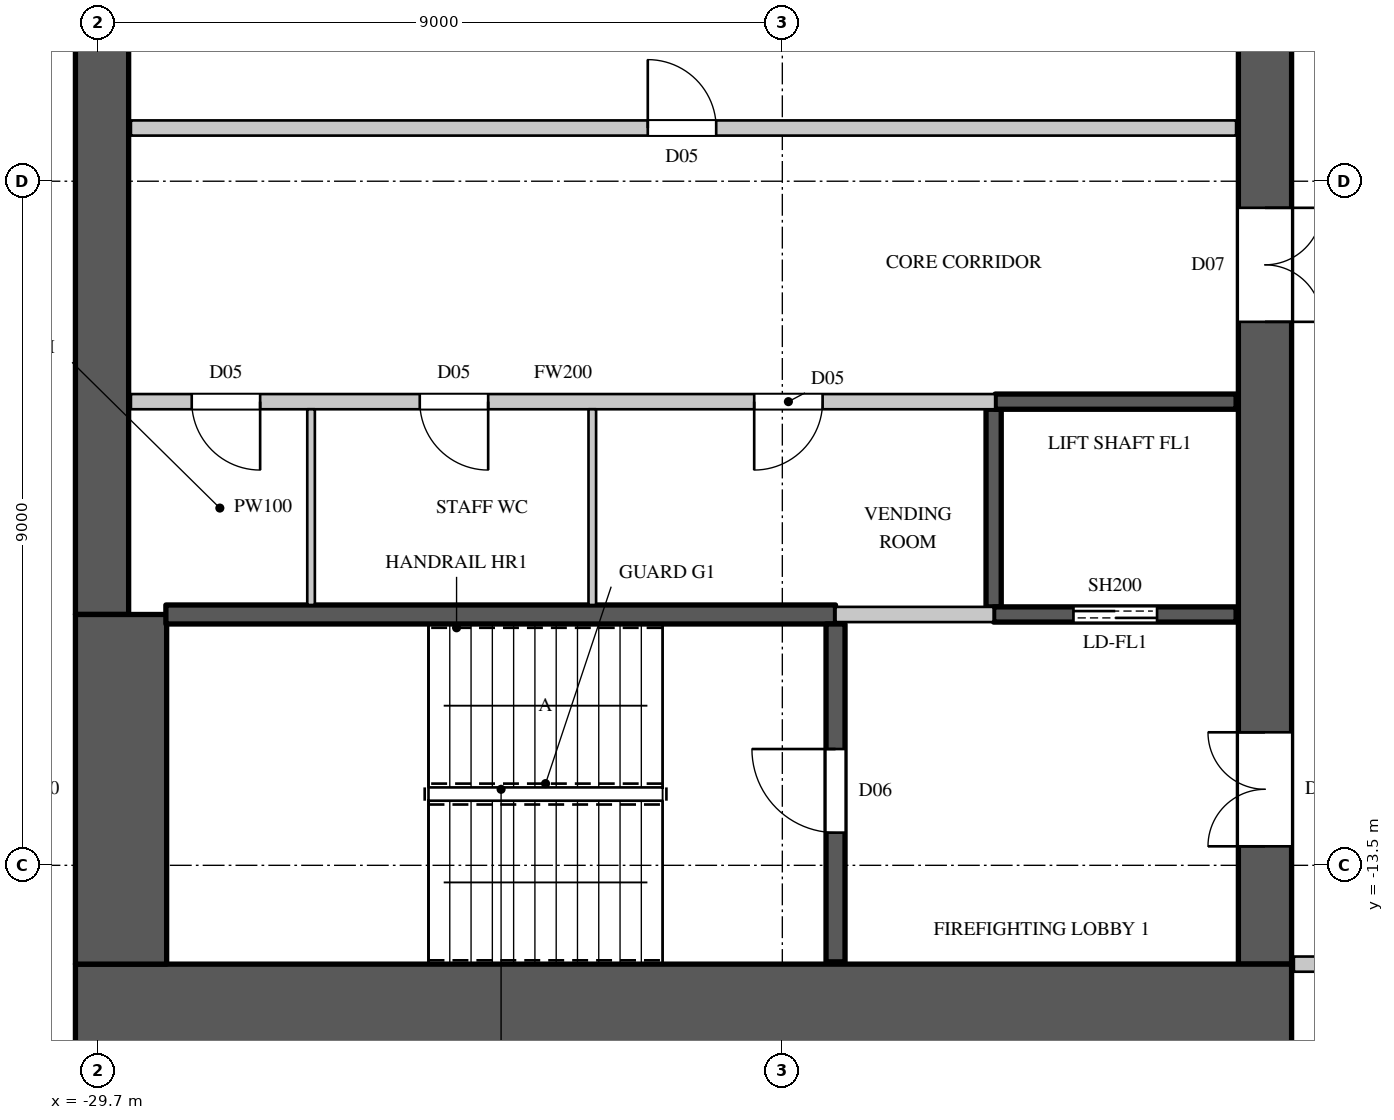
"""IFC4 building model, lengths in metres.
Left out: names, types, materials, properties, quantities, classifications, styles, units other than length and angle.
Written with IfcOpenShell. Run it as: python <this file> out.ifc"""

import sys

from ifc_helpers import new_model, si_unit, direction, frame, frame_2d, origin, place, context, subcontext, project, spatial, rectangle, extrude, element, fill, save


model = new_model("IFC4")
c1 = context("Model", 3, precision=1e-05, world=origin(), true_north=direction((0.0, 1.0)))
c2 = subcontext(c1, "Body", "Model", "MODEL_VIEW")
j1 = project(units=[si_unit("LENGTHUNIT", "METRE"), si_unit("PLANEANGLEUNIT", "RADIAN")], contexts=[c1])
p1 = place(None, origin())
s1 = spatial("IfcSite", under=j1, at=p1, CompositionType="ELEMENT")
p2 = place(p1, origin())
s2 = spatial("IfcBuilding", under=s1, at=p2, CompositionType="ELEMENT")
p3 = place(p2, frame((0.0, 0.0, 263.9)))
s3 = spatial("IfcBuildingStorey", under=s2, at=p3, CompositionType="ELEMENT", Elevation=263.9)
p4 = place(p3, frame((-30.0, -15.4, 0.0), z_axis=(0.0, 0.0, 1.0), x_axis=(1.0, 0.0, 0.0)))
e1 = element("IfcWall", 1, at=p4, inside=s3, PredefinedType="SHEAR", context=c2, shape_type="SweptSolid", body=[
    extrude(rectangle(XDim=16.0, YDim=1.2, at=frame_2d((8.0, 0.0))), origin(), (0.0, 0.0, 1.0), 4.1),
])
p5 = place(p3, frame((-14.35, -14.8, 0.0), z_axis=(0.0, 0.0, 1.0), x_axis=(0.0, 1.0, 0.0)))
e2 = element("IfcWall", 2, at=p5, inside=s3, PredefinedType="SHEAR", context=c2, shape_type="SweptSolid", body=[
    extrude(rectangle(XDim=29.6, YDim=0.7, at=frame_2d((14.8, 0.0))), origin(), (0.0, 0.0, 1.0), 4.1),
])
p6 = place(p5, frame((1.55, 0.0, 0.0)))
e3 = element("IfcOpeningElement", 3, at=p6, cuts=e2, PredefinedType="OPENING", context=c2, shape_type="SweptSolid", body=[
    extrude(rectangle(XDim=1.5, YDim=2.4, at=frame_2d((0.75, 1.2))), frame((0.0, 0.36, 0.0), z_axis=(0.0, -1.0, 0.0), x_axis=(1.0, 0.0, 0.0)), (0.0, 0.0, 1.0), 0.72),
])
p7 = place(p5, frame((26.55, 0.0, 0.0)))
e4 = element("IfcOpeningElement", 4, at=p7, cuts=e2, PredefinedType="OPENING", context=c2, shape_type="SweptSolid", body=[
    extrude(rectangle(XDim=1.5, YDim=2.4, at=frame_2d((0.75, 1.2))), frame((0.0, 0.36, 0.0), z_axis=(0.0, -1.0, 0.0), x_axis=(1.0, 0.0, 0.0)), (0.0, 0.0, 1.0), 0.72),
])
p8 = place(p5, frame((8.45, 0.0, 0.0)))
e5 = element("IfcOpeningElement", 5, at=p8, cuts=e2, PredefinedType="OPENING", context=c2, shape_type="SweptSolid", body=[
    extrude(rectangle(XDim=1.5, YDim=2.4, at=frame_2d((0.75, 1.2))), frame((0.0, 0.36, 0.0), z_axis=(0.0, -1.0, 0.0), x_axis=(1.0, 0.0, 0.0)), (0.0, 0.0, 1.0), 0.72),
])
p9 = place(p5, frame((19.65, 0.0, 0.0)))
e6 = element("IfcOpeningElement", 6, at=p9, cuts=e2, PredefinedType="OPENING", context=c2, shape_type="SweptSolid", body=[
    extrude(rectangle(XDim=1.5, YDim=2.4, at=frame_2d((0.75, 1.2))), frame((0.0, 0.36, 0.0), z_axis=(0.0, -1.0, 0.0), x_axis=(1.0, 0.0, 0.0)), (0.0, 0.0, 1.0), 0.72),
])
p10 = place(p5, frame((14.5, 0.0, 0.0)))
e7 = element("IfcOpeningElement", 7, at=p10, cuts=e2, PredefinedType="OPENING", context=c2, shape_type="SweptSolid", body=[
    extrude(rectangle(XDim=0.6, YDim=2.0, at=frame_2d((0.3, 1.0))), frame((0.0, 0.36, 0.0), z_axis=(0.0, -1.0, 0.0), x_axis=(1.0, 0.0, 0.0)), (0.0, 0.0, 1.0), 0.72),
])
p11 = place(p3, frame((-29.65, -10.2, 0.0), z_axis=(0.0, 0.0, 1.0), x_axis=(0.0, 1.0, 0.0)))
e8 = element("IfcWall", 8, at=p11, inside=s3, PredefinedType="SHEAR", context=c2, shape_type="SweptSolid", body=[
    extrude(rectangle(XDim=20.4, YDim=0.7, at=frame_2d((10.2, 0.0))), origin(), (0.0, 0.0, 1.0), 4.1),
])
p12 = place(p3, frame((-29.4, -14.8, 0.0), z_axis=(0.0, 0.0, 1.0), x_axis=(0.0, 1.0, 0.0)))
e9 = element("IfcWall", 9, at=p12, inside=s3, PredefinedType="SHEAR", context=c2, shape_type="SweptSolid", body=[
    extrude(rectangle(XDim=4.6, YDim=1.2, at=frame_2d((2.3, 0.0))), origin(), (0.0, 0.0, 1.0), 4.1),
])
p13 = place(p3, frame((-29.27, -7.4, 0.0), z_axis=(0.0, 0.0, 1.0), x_axis=(1.0, 0.0, 0.0)))
e10 = element("IfcWall", 10, at=p13, inside=s3, PredefinedType="PARTITIONING", context=c2, shape_type="SweptSolid", body=[
    extrude(rectangle(XDim=11.37, YDim=0.2, at=frame_2d((5.685, 0.0))), origin(), (0.0, 0.0, 1.0), 3.8),
])
p14 = place(p13, frame((0.8, 0.0, 0.0)))
e11 = element("IfcOpeningElement", 11, at=p14, cuts=e10, PredefinedType="OPENING", context=c2, shape_type="SweptSolid", body=[
    extrude(rectangle(XDim=0.9, YDim=2.2, at=frame_2d((0.45, 1.1))), frame((0.0, 0.11, 0.0), z_axis=(0.0, -1.0, 0.0), x_axis=(1.0, 0.0, 0.0)), (0.0, 0.0, 1.0), 0.22),
])
p15 = place(p13, frame((3.8, 0.0, 0.0)))
e12 = element("IfcOpeningElement", 12, at=p15, cuts=e10, PredefinedType="OPENING", context=c2, shape_type="SweptSolid", body=[
    extrude(rectangle(XDim=0.9, YDim=2.2, at=frame_2d((0.45, 1.1))), frame((0.0, 0.11, 0.0), z_axis=(0.0, -1.0, 0.0), x_axis=(1.0, 0.0, 0.0)), (0.0, 0.0, 1.0), 0.22),
])
p16 = place(p13, frame((8.2, 0.0, 0.0)))
e13 = element("IfcOpeningElement", 13, at=p16, cuts=e10, PredefinedType="OPENING", context=c2, shape_type="SweptSolid", body=[
    extrude(rectangle(XDim=0.9, YDim=2.2, at=frame_2d((0.45, 1.1))), frame((0.0, 0.11, 0.0), z_axis=(0.0, -1.0, 0.0), x_axis=(1.0, 0.0, 0.0)), (0.0, 0.0, 1.0), 0.22),
])
p17 = place(p3, frame((-29.27, -3.8, 0.0), z_axis=(0.0, 0.0, 1.0), x_axis=(1.0, 0.0, 0.0)))
e14 = element("IfcWall", 14, at=p17, inside=s3, PredefinedType="PARTITIONING", context=c2, shape_type="SweptSolid", body=[
    extrude(rectangle(XDim=14.54, YDim=0.2, at=frame_2d((7.27, 0.0))), origin(), (0.0, 0.0, 1.0), 3.8),
])
p18 = place(p17, frame((6.8, 0.0, 0.0)))
e15 = element("IfcOpeningElement", 15, at=p18, cuts=e14, PredefinedType="OPENING", context=c2, shape_type="SweptSolid", body=[
    extrude(rectangle(XDim=0.9, YDim=2.2, at=frame_2d((0.45, 1.1))), frame((0.0, 0.11, 0.0), z_axis=(0.0, -1.0, 0.0), x_axis=(1.0, 0.0, 0.0)), (0.0, 0.0, 1.0), 0.22),
])
p19 = place(p3, frame((-20.0, -10.2, 0.0), z_axis=(0.0, 0.0, 1.0), x_axis=(1.0, 0.0, 0.0)))
e16 = element("IfcWall", 16, at=p19, inside=s3, PredefinedType="PARTITIONING", context=c2, shape_type="SweptSolid", body=[
    extrude(rectangle(XDim=2.08, YDim=0.2, at=frame_2d((1.04, 0.0))), origin(), (0.0, 0.0, 1.0), 3.8),
])
p20 = place(p3, frame((-13.97, -14.8, 0.0), z_axis=(0.0, 0.0, 1.0), x_axis=(1.0, 0.0, 0.0)))
e17 = element("IfcWall", 17, at=p20, inside=s3, PredefinedType="PARTITIONING", context=c2, shape_type="SweptSolid", body=[
    extrude(rectangle(XDim=2.87, YDim=0.2, at=frame_2d((1.435, 0.0))), origin(), (0.0, 0.0, 1.0), 3.8),
])
p21 = place(p3, frame((-17.92, -10.1, 0.0), z_axis=(0.0, 0.0, 1.0), x_axis=(0.0, 1.0, 0.0)))
e18 = element("IfcWall", 18, at=p21, inside=s3, PredefinedType="SHEAR", context=c2, shape_type="SweptSolid", body=[
    extrude(rectangle(XDim=2.6, YDim=0.2, at=frame_2d((1.3, 0.0))), origin(), (0.0, 0.0, 1.0), 3.8),
])
p22 = place(p3, frame((-17.92, -10.2, 0.0), z_axis=(0.0, 0.0, 1.0), x_axis=(1.0, 0.0, 0.0)))
e19 = element("IfcWall", 19, at=p22, inside=s3, PredefinedType="SHEAR", context=c2, shape_type="SweptSolid", body=[
    extrude(rectangle(XDim=3.19, YDim=0.2, at=frame_2d((1.595, 0.0))), origin(), (0.0, 0.0, 1.0), 3.8),
])
p23 = place(p22, frame((1.05, 0.0, 0.0)))
e20 = element("IfcOpeningElement", 20, at=p23, cuts=e19, PredefinedType="OPENING", context=c2, shape_type="SweptSolid", body=[
    extrude(rectangle(XDim=1.1, YDim=2.2, at=frame_2d((0.55, 1.1))), frame((0.0, 0.11, 0.0), z_axis=(0.0, -1.0, 0.0), x_axis=(1.0, 0.0, 0.0)), (0.0, 0.0, 1.0), 0.22),
])
p24 = place(p3, frame((-17.9, -7.4, 0.0), z_axis=(0.0, 0.0, 1.0), x_axis=(1.0, 0.0, 0.0)))
e21 = element("IfcWall", 21, at=p24, inside=s3, PredefinedType="SHEAR", context=c2, shape_type="SweptSolid", body=[
    extrude(rectangle(XDim=3.17, YDim=0.2, at=frame_2d((1.585, 0.0))), origin(), (0.0, 0.0, 1.0), 3.8),
])
p25 = place(p3, frame((-28.81, -10.2, 0.0), z_axis=(0.0, 0.0, 1.0), x_axis=(1.0, 0.0, 0.0)))
e22 = element("IfcWall", 22, at=p25, inside=s3, PredefinedType="SHEAR", context=c2, shape_type="SweptSolid", body=[
    extrude(rectangle(XDim=8.81, YDim=0.25, at=frame_2d((4.405, 0.0))), origin(), (0.0, 0.0, 1.0), 3.8),
])
p26 = place(p3, frame((-20.0, -14.77, 0.0), z_axis=(0.0, 0.0, 1.0), x_axis=(0.0, 1.0, 0.0)))
e23 = element("IfcWall", 23, at=p26, inside=s3, PredefinedType="SHEAR", context=c2, shape_type="SweptSolid", body=[
    extrude(rectangle(XDim=4.445, YDim=0.25, at=frame_2d((2.223, 0.0))), origin(), (0.0, 0.0, 1.0), 3.8),
])
p27 = place(p26, frame((1.7, 0.0, 0.0)))
e24 = element("IfcOpeningElement", 24, at=p27, cuts=e23, PredefinedType="OPENING", context=c2, shape_type="SweptSolid", body=[
    extrude(rectangle(XDim=1.1, YDim=2.2, at=frame_2d((0.55, 1.1))), frame((0.0, 0.135, 0.0), z_axis=(0.0, -1.0, 0.0), x_axis=(1.0, 0.0, 0.0)), (0.0, 0.0, 1.0), 0.27),
])
for number, where, z_axis, x_axis in (
    (25, (-26.9, -10.075, 0.0), (0.0, 0.0, 1.0), (0.0, 1.0, 0.0)),
    (26, (-23.2, -10.075, 0.0), (0.0, 0.0, 1.0), (0.0, 1.0, 0.0)),
):
    element("IfcWall", number, at=place(p3, frame(where, z_axis=z_axis, x_axis=x_axis)), inside=s3, PredefinedType="PARTITIONING", context=c2, shape_type="SweptSolid", body=[
        extrude(rectangle(XDim=2.575, YDim=0.1, at=frame_2d((1.288, 0.0))), origin(), (0.0, 0.0, 1.0), 3.8),
    ])
p28 = place(p27, origin())
e27 = element("IfcDoor", 27, at=p28, inside=s3, OperationType="SINGLE_SWING_RIGHT", PredefinedType="DOOR", context=c2, shape_type="SweptSolid", body=[
    extrude(rectangle(XDim=1.1, YDim=2.2, at=frame_2d((0.55, 1.1))), frame((0.0, 0.025, 0.0), z_axis=(0.0, -1.0, 0.0), x_axis=(1.0, 0.0, 0.0)), (0.0, 0.0, 1.0), 0.05),
])
fill(e24, e27)
p29 = place(p14, origin())
e28 = element("IfcDoor", 28, at=p29, inside=s3, OperationType="SINGLE_SWING_LEFT", PredefinedType="DOOR", context=c2, shape_type="SweptSolid", body=[
    extrude(rectangle(XDim=0.9, YDim=2.2, at=frame_2d((0.45, 1.1))), frame((0.0, 0.025, 0.0), z_axis=(0.0, -1.0, 0.0), x_axis=(1.0, 0.0, 0.0)), (0.0, 0.0, 1.0), 0.05),
])
fill(e11, e28)
p30 = place(p15, origin())
e29 = element("IfcDoor", 29, at=p30, inside=s3, OperationType="SINGLE_SWING_LEFT", PredefinedType="DOOR", context=c2, shape_type="SweptSolid", body=[
    extrude(rectangle(XDim=0.9, YDim=2.2, at=frame_2d((0.45, 1.1))), frame((0.0, 0.025, 0.0), z_axis=(0.0, -1.0, 0.0), x_axis=(1.0, 0.0, 0.0)), (0.0, 0.0, 1.0), 0.05),
])
fill(e12, e29)
p31 = place(p16, origin())
e30 = element("IfcDoor", 30, at=p31, inside=s3, OperationType="SINGLE_SWING_RIGHT", PredefinedType="DOOR", context=c2, shape_type="SweptSolid", body=[
    extrude(rectangle(XDim=0.9, YDim=2.2, at=frame_2d((0.45, 1.1))), frame((0.0, 0.025, 0.0), z_axis=(0.0, -1.0, 0.0), x_axis=(1.0, 0.0, 0.0)), (0.0, 0.0, 1.0), 0.05),
])
fill(e13, e30)
p32 = place(p18, origin())
e31 = element("IfcDoor", 31, at=p32, inside=s3, OperationType="SINGLE_SWING_LEFT", PredefinedType="DOOR", context=c2, shape_type="SweptSolid", body=[
    extrude(rectangle(XDim=0.9, YDim=2.2, at=frame_2d((0.45, 1.1))), frame((0.0, 0.025, 0.0), z_axis=(0.0, -1.0, 0.0), x_axis=(1.0, 0.0, 0.0)), (0.0, 0.0, 1.0), 0.05),
])
fill(e15, e31)
p33 = place(p23, origin())
e32 = element("IfcDoor", 32, at=p33, inside=s3, OperationType="DOUBLE_DOOR_SLIDING", PredefinedType="DOOR", context=c2, shape_type="SweptSolid", body=[
    extrude(rectangle(XDim=1.1, YDim=2.2, at=frame_2d((0.55, 1.1))), frame((0.0, 0.025, 0.0), z_axis=(0.0, -1.0, 0.0), x_axis=(1.0, 0.0, 0.0)), (0.0, 0.0, 1.0), 0.05),
])
fill(e20, e32)
p34 = place(p6, origin())
e33 = element("IfcDoor", 33, at=p34, inside=s3, OperationType="DOUBLE_DOOR_SINGLE_SWING", PredefinedType="DOOR", context=c2, shape_type="SweptSolid", body=[
    extrude(rectangle(XDim=1.5, YDim=2.4, at=frame_2d((0.75, 1.2))), frame((0.0, 0.345, 0.0), z_axis=(0.0, -1.0, 0.0), x_axis=(1.0, 0.0, 0.0)), (0.0, 0.0, 1.0), 0.05),
])
fill(e3, e33)
p35 = place(p8, origin())
e34 = element("IfcDoor", 34, at=p35, inside=s3, OperationType="DOUBLE_DOOR_SINGLE_SWING", PredefinedType="DOOR", context=c2, shape_type="SweptSolid", body=[
    extrude(rectangle(XDim=1.5, YDim=2.4, at=frame_2d((0.75, 1.2))), frame((0.0, -0.295, 0.0), z_axis=(0.0, -1.0, 0.0), x_axis=(1.0, 0.0, 0.0)), (0.0, 0.0, 1.0), 0.05),
])
fill(e5, e34)
save(model, sys.argv[1])
